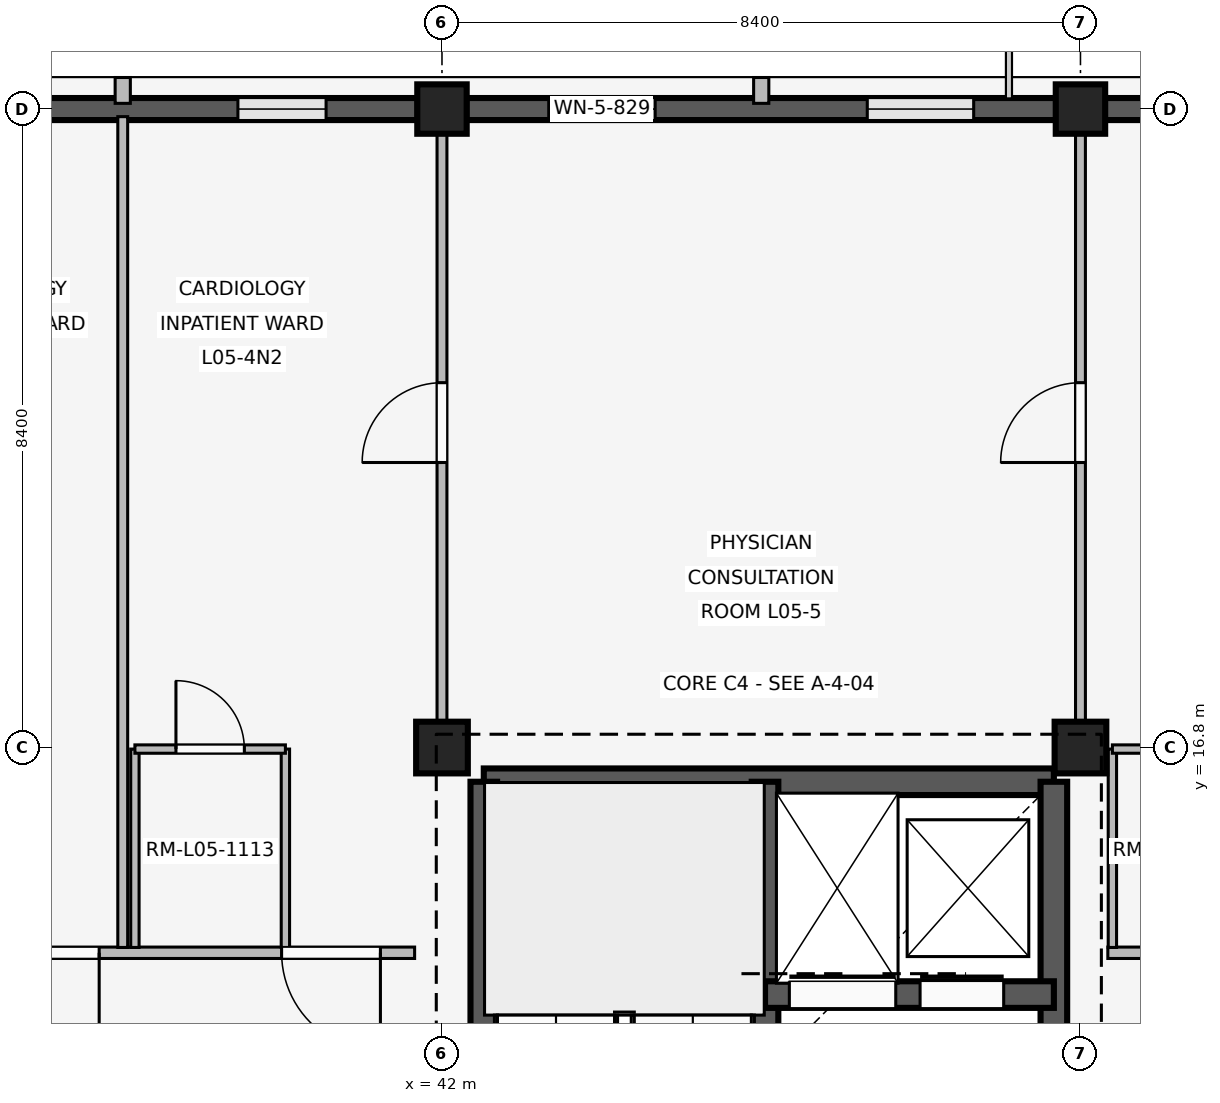
"""IFC4 building model, lengths in metres.
Left out: names, types, materials, properties, quantities, classifications, styles, units other than length and angle.
Written with IfcOpenShell. Run it as: python <this file> out.ifc"""

import sys

from ifc_helpers import new_model, si_unit, direction, frame, frame_2d, origin, origin_2d, place, context, subcontext, project, spatial, rectangle, extrude, element, fill, save


model = new_model("IFC4")
c1 = context("Model", 3, precision=1e-05, world=origin(), true_north=direction((0.0, 1.0)))
c2 = subcontext(c1, "Body", "Model", "MODEL_VIEW")
j1 = project(units=[si_unit("LENGTHUNIT", "METRE"), si_unit("PLANEANGLEUNIT", "RADIAN")], contexts=[c1])
p1 = place(None, origin())
s1 = spatial("IfcSite", under=j1, at=p1, CompositionType="ELEMENT")
p2 = place(p1, origin())
s2 = spatial("IfcBuilding", under=s1, at=p2, CompositionType="ELEMENT")
p3 = place(p2, frame((0.0, 0.0, 20.4)))
s3 = spatial("IfcBuildingStorey", under=s2, at=p3, CompositionType="ELEMENT", Elevation=20.4)
p4 = place(p3, frame((42.0, 16.8, 0.0), z_axis=(0.0, 0.0, 1.0), x_axis=(1.0, 0.0, 0.0)))
e1 = element("IfcColumn", 1, at=p4, inside=s3, PredefinedType="COLUMN", context=c2, shape_type="SweptSolid", body=[
    extrude(rectangle(XDim=0.68, YDim=0.68, at=origin_2d()), origin(), (0.0, 0.0, 1.0), 4.2),
])
p5 = place(p3, frame((42.0, 25.2, 0.0), z_axis=(0.0, 0.0, 1.0), x_axis=(1.0, 0.0, 0.0)))
e2 = element("IfcColumn", 2, at=p5, inside=s3, PredefinedType="COLUMN", context=c2, shape_type="SweptSolid", body=[
    extrude(rectangle(XDim=0.65, YDim=0.65, at=origin_2d()), origin(), (0.0, 0.0, 1.0), 4.2),
])
p6 = place(p3, frame((50.4, 16.8, 0.0), z_axis=(0.0, 0.0, 1.0), x_axis=(1.0, 0.0, 0.0)))
e3 = element("IfcColumn", 3, at=p6, inside=s3, PredefinedType="COLUMN", context=c2, shape_type="SweptSolid", body=[
    extrude(rectangle(XDim=0.68, YDim=0.68, at=origin_2d()), origin(), (0.0, 0.0, 1.0), 4.2),
])
p7 = place(p3, frame((50.4, 25.2, 0.0), z_axis=(0.0, 0.0, 1.0), x_axis=(1.0, 0.0, 0.0)))
e4 = element("IfcColumn", 4, at=p7, inside=s3, PredefinedType="COLUMN", context=c2, shape_type="SweptSolid", body=[
    extrude(rectangle(XDim=0.65, YDim=0.65, at=origin_2d()), origin(), (0.0, 0.0, 1.0), 4.2),
])
p8 = place(p3, frame((33.92, 25.2, 0.0), z_axis=(0.0, 0.0, 1.0), x_axis=(1.0, 0.0, 0.0)))
e5 = element("IfcWall", 5, at=p8, inside=s3, PredefinedType="SOLIDWALL", context=c2, shape_type="SweptSolid", body=[
    extrude(rectangle(XDim=7.76, YDim=0.29, at=frame_2d((3.88, 0.0))), origin(), (0.0, 0.0, 1.0), 3.34),
])
p9 = place(p8, frame((1.205, 0.0, 0.85)))
e6 = element("IfcOpeningElement", 6, at=p9, cuts=e5, PredefinedType="OPENING", context=c2, shape_type="SweptSolid", body=[
    extrude(rectangle(XDim=1.16, YDim=1.48, at=frame_2d((0.58, 0.74))), frame((0.0, 0.155, 0.0), z_axis=(0.0, -1.0, 0.0), x_axis=(1.0, 0.0, 0.0)), (0.0, 0.0, 1.0), 0.31),
])
p10 = place(p8, frame((5.395, 0.0, 0.85)))
e7 = element("IfcOpeningElement", 7, at=p10, cuts=e5, PredefinedType="OPENING", context=c2, shape_type="SweptSolid", body=[
    extrude(rectangle(XDim=1.16, YDim=1.48, at=frame_2d((0.58, 0.74))), frame((0.0, 0.155, 0.0), z_axis=(0.0, -1.0, 0.0), x_axis=(1.0, 0.0, 0.0)), (0.0, 0.0, 1.0), 0.31),
])
p11 = place(p3, frame((37.8, 25.275, 0.0), z_axis=(0.0, 0.0, 1.0), x_axis=(0.0, 1.0, 0.0)))
e8 = element("IfcWall", 8, at=p11, inside=s3, PredefinedType="ELEMENTEDWALL", context=c2, shape_type="SweptSolid", body=[
    extrude(rectangle(XDim=0.34, YDim=0.2, at=frame_2d((0.17, 0.0))), origin(), (0.0, 0.0, 1.0), 3.32),
])
p12 = place(p3, frame((42.32, 25.2, 0.0), z_axis=(0.0, 0.0, 1.0), x_axis=(1.0, 0.0, 0.0)))
e9 = element("IfcWall", 9, at=p12, inside=s3, PredefinedType="SOLIDWALL", context=c2, shape_type="SweptSolid", body=[
    extrude(rectangle(XDim=7.76, YDim=0.29, at=frame_2d((3.88, 0.0))), origin(), (0.0, 0.0, 1.0), 3.34),
])
p13 = place(p12, frame((1.085, 0.0, 0.85)))
e10 = element("IfcOpeningElement", 10, at=p13, cuts=e9, PredefinedType="OPENING", context=c2, shape_type="SweptSolid", body=[
    extrude(rectangle(XDim=1.4, YDim=1.4, at=frame_2d((0.7, 0.7))), frame((0.0, 0.155, 0.0), z_axis=(0.0, -1.0, 0.0), x_axis=(1.0, 0.0, 0.0)), (0.0, 0.0, 1.0), 0.31),
])
p14 = place(p12, frame((5.275, 0.0, 0.85)))
e11 = element("IfcOpeningElement", 11, at=p14, cuts=e9, PredefinedType="OPENING", context=c2, shape_type="SweptSolid", body=[
    extrude(rectangle(XDim=1.4, YDim=1.4, at=frame_2d((0.7, 0.7))), frame((0.0, 0.155, 0.0), z_axis=(0.0, -1.0, 0.0), x_axis=(1.0, 0.0, 0.0)), (0.0, 0.0, 1.0), 0.31),
])
p15 = place(p3, frame((46.2, 25.275, 0.0), z_axis=(0.0, 0.0, 1.0), x_axis=(0.0, 1.0, 0.0)))
e12 = element("IfcWall", 12, at=p15, inside=s3, PredefinedType="ELEMENTEDWALL", context=c2, shape_type="SweptSolid", body=[
    extrude(rectangle(XDim=0.34, YDim=0.2, at=frame_2d((0.17, 0.0))), origin(), (0.0, 0.0, 1.0), 3.32),
])
p16 = place(p3, frame((50.72, 25.2, 0.0), z_axis=(0.0, 0.0, 1.0), x_axis=(1.0, 0.0, 0.0)))
e13 = element("IfcWall", 13, at=p16, inside=s3, PredefinedType="SOLIDWALL", context=c2, shape_type="SweptSolid", body=[
    extrude(rectangle(XDim=7.76, YDim=0.29, at=frame_2d((3.88, 0.0))), origin(), (0.0, 0.0, 1.0), 3.34),
])
p17 = place(p16, frame((1.035, 0.0, 0.85)))
e14 = element("IfcOpeningElement", 14, at=p17, cuts=e13, PredefinedType="OPENING", context=c2, shape_type="SweptSolid", body=[
    extrude(rectangle(XDim=1.5, YDim=1.55, at=frame_2d((0.75, 0.775))), frame((0.0, 0.155, 0.0), z_axis=(0.0, -1.0, 0.0), x_axis=(1.0, 0.0, 0.0)), (0.0, 0.0, 1.0), 0.31),
])
p18 = place(p16, frame((5.225, 0.0, 0.85)))
e15 = element("IfcOpeningElement", 15, at=p18, cuts=e13, PredefinedType="OPENING", context=c2, shape_type="SweptSolid", body=[
    extrude(rectangle(XDim=1.5, YDim=1.55, at=frame_2d((0.75, 0.775))), frame((0.0, 0.155, 0.0), z_axis=(0.0, -1.0, 0.0), x_axis=(1.0, 0.0, 0.0)), (0.0, 0.0, 1.0), 0.31),
])
p19 = place(p3, frame((42.55, 16.35, 0.0), z_axis=(0.0, 0.0, 1.0), x_axis=(1.0, 0.0, 0.0)))
e16 = element("IfcWall", 16, at=p19, inside=s3, PredefinedType="SHEAR", context=c2, shape_type="SweptSolid", body=[
    extrude(rectangle(XDim=7.5, YDim=0.35, at=frame_2d((3.75, 0.0))), origin(), (0.0, 0.0, 1.0), 3.92),
])
p20 = place(p3, frame((42.55, 8.8, 0.0), z_axis=(0.0, 0.0, 1.0), x_axis=(0.0, 1.0, 0.0)))
e17 = element("IfcWall", 17, at=p20, inside=s3, PredefinedType="SHEAR", context=c2, shape_type="SweptSolid", body=[
    extrude(rectangle(XDim=7.55, YDim=0.35, at=frame_2d((3.775, 0.0))), origin(), (0.0, 0.0, 1.0), 3.92),
])
p21 = place(p20, frame((0.28, 0.0, 0.0)))
e18 = element("IfcOpeningElement", 18, at=p21, cuts=e17, PredefinedType="OPENING", context=c2, shape_type="SweptSolid", body=[
    extrude(rectangle(XDim=1.0, YDim=2.15, at=frame_2d((0.5, 1.075))), frame((0.0, 0.185, 0.0), z_axis=(0.0, -1.0, 0.0), x_axis=(1.0, 0.0, 0.0)), (0.0, 0.0, 1.0), 0.37),
])
p22 = place(p3, frame((50.05, 8.8, 0.0), z_axis=(0.0, 0.0, 1.0), x_axis=(0.0, 1.0, 0.0)))
e19 = element("IfcWall", 19, at=p22, inside=s3, PredefinedType="SHEAR", context=c2, shape_type="SweptSolid", body=[
    extrude(rectangle(XDim=7.55, YDim=0.35, at=frame_2d((3.775, 0.0))), origin(), (0.0, 0.0, 1.0), 3.92),
])
p23 = place(p22, frame((2.4, 0.0, 0.0)))
e20 = element("IfcOpeningElement", 20, at=p23, cuts=e19, PredefinedType="OPENING", context=c2, shape_type="SweptSolid", body=[
    extrude(rectangle(XDim=1.2, YDim=2.2, at=frame_2d((0.6, 1.1))), frame((0.0, 0.185, 0.0), z_axis=(0.0, -1.0, 0.0), x_axis=(1.0, 0.0, 0.0)), (0.0, 0.0, 1.0), 0.37),
])
p24 = place(p3, frame((46.25, 8.8, 0.0), z_axis=(0.0, 0.0, 1.0), x_axis=(0.0, 1.0, 0.0)))
e21 = element("IfcWall", 21, at=p24, inside=s3, PredefinedType="SHEAR", context=c2, shape_type="SweptSolid", body=[
    extrude(rectangle(XDim=7.55, YDim=0.35, at=frame_2d((3.775, 0.0))), origin(), (0.0, 0.0, 1.0), 3.92),
])
p25 = place(p24, frame((0.28, 0.0, 0.0)))
e22 = element("IfcOpeningElement", 22, at=p25, cuts=e21, PredefinedType="OPENING", context=c2, shape_type="SweptSolid", body=[
    extrude(rectangle(XDim=1.0, YDim=2.15, at=frame_2d((0.5, 1.075))), frame((0.0, 0.185, 0.0), z_axis=(0.0, -1.0, 0.0), x_axis=(1.0, 0.0, 0.0)), (0.0, 0.0, 1.0), 0.37),
])
p26 = place(p3, frame((46.25, 13.55, 0.0), z_axis=(0.0, 0.0, 1.0), x_axis=(1.0, 0.0, 0.0)))
e23 = element("IfcWall", 23, at=p26, inside=s3, PredefinedType="SHEAR", context=c2, shape_type="SweptSolid", body=[
    extrude(rectangle(XDim=3.8, YDim=0.35, at=frame_2d((1.9, 0.0))), origin(), (0.0, 0.0, 1.0), 3.92),
])
p27 = place(p26, frame((0.32, 0.0, 0.0)))
e24 = element("IfcOpeningElement", 24, at=p27, cuts=e23, PredefinedType="OPENING", context=c2, shape_type="SweptSolid", body=[
    extrude(rectangle(XDim=1.4, YDim=2.25, at=frame_2d((0.7, 1.125))), frame((0.0, 0.185, 0.0), z_axis=(0.0, -1.0, 0.0), x_axis=(1.0, 0.0, 0.0)), (0.0, 0.0, 1.0), 0.37),
])
p28 = place(p26, frame((2.04, 0.0, 0.0)))
e25 = element("IfcOpeningElement", 25, at=p28, cuts=e23, PredefinedType="OPENING", context=c2, shape_type="SweptSolid", body=[
    extrude(rectangle(XDim=1.1, YDim=2.15, at=frame_2d((0.55, 1.075))), frame((0.0, 0.185, 0.0), z_axis=(0.0, -1.0, 0.0), x_axis=(1.0, 0.0, 0.0)), (0.0, 0.0, 1.0), 0.37),
])
p29 = place(p3, frame((41.64, 14.1, 0.0), z_axis=(0.0, 0.0, 1.0), x_axis=(-1.0, 0.0, 0.0)))
e26 = element("IfcWall", 26, at=p29, inside=s3, PredefinedType="PARTITIONING", context=c2, shape_type="SweptSolid", body=[
    extrude(rectangle(XDim=7.96, YDim=0.15, at=frame_2d((3.98, 0.0))), origin(), (0.0, 0.0, 1.0), 3.32),
])
p30 = place(p29, frame((0.45, 0.0, 0.0)))
e27 = element("IfcOpeningElement", 27, at=p30, cuts=e26, PredefinedType="OPENING", context=c2, shape_type="SweptSolid", body=[
    extrude(rectangle(XDim=1.3, YDim=2.25, at=frame_2d((0.65, 1.125))), frame((0.0, 0.085, 0.0), z_axis=(0.0, -1.0, 0.0), x_axis=(1.0, 0.0, 0.0)), (0.0, 0.0, 1.0), 0.17),
])
p31 = place(p29, frame((4.15, 0.0, 0.0)))
e28 = element("IfcOpeningElement", 28, at=p31, cuts=e26, PredefinedType="OPENING", context=c2, shape_type="SweptSolid", body=[
    extrude(rectangle(XDim=1.3, YDim=2.25, at=frame_2d((0.65, 1.125))), frame((0.0, 0.085, 0.0), z_axis=(0.0, -1.0, 0.0), x_axis=(1.0, 0.0, 0.0)), (0.0, 0.0, 1.0), 0.17),
])
p32 = place(p3, frame((37.8, 14.17, 0.0), z_axis=(0.0, 0.0, 1.0), x_axis=(0.0, 1.0, 0.0)))
e29 = element("IfcWall", 29, at=p32, inside=s3, PredefinedType="PARTITIONING", context=c2, shape_type="SweptSolid", body=[
    extrude(rectangle(XDim=10.93, YDim=0.13, at=frame_2d((5.465, 0.0))), origin(), (0.0, 0.0, 1.0), 3.32),
])
for number, where, z_axis, x_axis in (
    (30, (37.96, 14.17, 0.0), (0.0, 0.0, 1.0), (0.0, 1.0, 0.0)),
    (31, (39.94, 14.17, 0.0), (0.0, 0.0, 1.0), (0.0, 1.0, 0.0)),
):
    element("IfcWall", number, at=place(p3, frame(where, z_axis=z_axis, x_axis=x_axis)), inside=s3, PredefinedType="PARTITIONING", context=c2, shape_type="SweptSolid", body=[
        extrude(rectangle(XDim=2.61, YDim=0.11, at=frame_2d((1.305, 0.0))), origin(), (0.0, 0.0, 1.0), 3.32),
    ])
p33 = place(p3, frame((37.96, 16.78, 0.0), z_axis=(0.0, 0.0, 1.0), x_axis=(1.0, 0.0, 0.0)))
e32 = element("IfcWall", 32, at=p33, inside=s3, PredefinedType="PARTITIONING", context=c2, shape_type="SweptSolid", body=[
    extrude(rectangle(XDim=1.98, YDim=0.11, at=frame_2d((0.99, 0.0))), origin(), (0.0, 0.0, 1.0), 3.32),
])
p34 = place(p33, frame((0.54, 0.0, 0.0)))
e33 = element("IfcOpeningElement", 33, at=p34, cuts=e32, PredefinedType="OPENING", context=c2, shape_type="SweptSolid", body=[
    extrude(rectangle(XDim=0.9, YDim=2.1, at=frame_2d((0.45, 1.05))), frame((0.0, 0.065, 0.0), z_axis=(0.0, -1.0, 0.0), x_axis=(1.0, 0.0, 0.0)), (0.0, 0.0, 1.0), 0.13),
])
p35 = place(p3, frame((42.0, 17.15, 0.0), z_axis=(0.0, 0.0, 1.0), x_axis=(0.0, 1.0, 0.0)))
e34 = element("IfcWall", 34, at=p35, inside=s3, PredefinedType="PARTITIONING", context=c2, shape_type="SweptSolid", body=[
    extrude(rectangle(XDim=7.91, YDim=0.13, at=frame_2d((3.955, 0.0))), origin(), (0.0, 0.0, 1.0), 3.32),
])
p36 = place(p35, frame((3.4, 0.0, 0.0)))
e35 = element("IfcOpeningElement", 35, at=p36, cuts=e34, PredefinedType="OPENING", context=c2, shape_type="SweptSolid", body=[
    extrude(rectangle(XDim=1.05, YDim=2.2, at=frame_2d((0.525, 1.1))), frame((0.0, 0.075, 0.0), z_axis=(0.0, -1.0, 0.0), x_axis=(1.0, 0.0, 0.0)), (0.0, 0.0, 1.0), 0.15),
])
p37 = place(p3, frame((50.4, 17.15, 0.0), z_axis=(0.0, 0.0, 1.0), x_axis=(0.0, 1.0, 0.0)))
e36 = element("IfcWall", 36, at=p37, inside=s3, PredefinedType="PARTITIONING", context=c2, shape_type="SweptSolid", body=[
    extrude(rectangle(XDim=7.91, YDim=0.13, at=frame_2d((3.955, 0.0))), origin(), (0.0, 0.0, 1.0), 3.32),
])
p38 = place(p37, frame((3.4, 0.0, 0.0)))
e37 = element("IfcOpeningElement", 37, at=p38, cuts=e36, PredefinedType="OPENING", context=c2, shape_type="SweptSolid", body=[
    extrude(rectangle(XDim=1.05, YDim=2.2, at=frame_2d((0.525, 1.1))), frame((0.0, 0.075, 0.0), z_axis=(0.0, -1.0, 0.0), x_axis=(1.0, 0.0, 0.0)), (0.0, 0.0, 1.0), 0.15),
])
p39 = place(p3, frame((58.72, 14.1, 0.0), z_axis=(0.0, 0.0, 1.0), x_axis=(-1.0, 0.0, 0.0)))
e38 = element("IfcWall", 38, at=p39, inside=s3, PredefinedType="PARTITIONING", context=c2, shape_type="SweptSolid", body=[
    extrude(rectangle(XDim=7.96, YDim=0.15, at=frame_2d((3.98, 0.0))), origin(), (0.0, 0.0, 1.0), 3.32),
])
p40 = place(p39, frame((0.73, 0.0, 0.0)))
e39 = element("IfcOpeningElement", 39, at=p40, cuts=e38, PredefinedType="OPENING", context=c2, shape_type="SweptSolid", body=[
    extrude(rectangle(XDim=1.3, YDim=2.25, at=frame_2d((0.65, 1.125))), frame((0.0, 0.085, 0.0), z_axis=(0.0, -1.0, 0.0), x_axis=(1.0, 0.0, 0.0)), (0.0, 0.0, 1.0), 0.17),
])
p41 = place(p39, frame((4.43, 0.0, 0.0)))
e40 = element("IfcOpeningElement", 40, at=p41, cuts=e38, PredefinedType="OPENING", context=c2, shape_type="SweptSolid", body=[
    extrude(rectangle(XDim=1.3, YDim=2.25, at=frame_2d((0.65, 1.125))), frame((0.0, 0.085, 0.0), z_axis=(0.0, -1.0, 0.0), x_axis=(1.0, 0.0, 0.0)), (0.0, 0.0, 1.0), 0.17),
])
p42 = place(p3, frame((50.82, 14.17, 0.0), z_axis=(0.0, 0.0, 1.0), x_axis=(0.0, 1.0, 0.0)))
e41 = element("IfcWall", 41, at=p42, inside=s3, PredefinedType="PARTITIONING", context=c2, shape_type="SweptSolid", body=[
    extrude(rectangle(XDim=2.61, YDim=0.11, at=frame_2d((1.305, 0.0))), origin(), (0.0, 0.0, 1.0), 3.32),
])
p43 = place(p3, frame((50.82, 16.78, 0.0), z_axis=(0.0, 0.0, 1.0), x_axis=(1.0, 0.0, 0.0)))
e42 = element("IfcWall", 42, at=p43, inside=s3, PredefinedType="PARTITIONING", context=c2, shape_type="SweptSolid", body=[
    extrude(rectangle(XDim=1.98, YDim=0.11, at=frame_2d((0.99, 0.0))), origin(), (0.0, 0.0, 1.0), 3.32),
])
p44 = place(p43, frame((0.54, 0.0, 0.0)))
e43 = element("IfcOpeningElement", 43, at=p44, cuts=e42, PredefinedType="OPENING", context=c2, shape_type="SweptSolid", body=[
    extrude(rectangle(XDim=0.9, YDim=2.1, at=frame_2d((0.45, 1.05))), frame((0.0, 0.065, 0.0), z_axis=(0.0, -1.0, 0.0), x_axis=(1.0, 0.0, 0.0)), (0.0, 0.0, 1.0), 0.13),
])
p45 = place(p10, origin())
e44 = element("IfcWindow", 44, at=p45, inside=s3, PartitioningType="SINGLE_PANEL", PredefinedType="WINDOW", context=c2, shape_type="SweptSolid", body=[
    extrude(rectangle(XDim=1.16, YDim=1.48, at=frame_2d((0.58, 0.74))), frame((0.0, 0.03, 0.0), z_axis=(0.0, -1.0, 0.0), x_axis=(1.0, 0.0, 0.0)), (0.0, 0.0, 1.0), 0.06),
])
fill(e7, e44)
p46 = place(p13, origin())
e45 = element("IfcWindow", 45, at=p46, inside=s3, PartitioningType="SINGLE_PANEL", PredefinedType="WINDOW", context=c2, shape_type="SweptSolid", body=[
    extrude(rectangle(XDim=1.4, YDim=1.4, at=frame_2d((0.7, 0.7))), frame((0.0, 0.03, 0.0), z_axis=(0.0, -1.0, 0.0), x_axis=(1.0, 0.0, 0.0)), (0.0, 0.0, 1.0), 0.06),
])
fill(e10, e45)
p47 = place(p14, origin())
e46 = element("IfcWindow", 46, at=p47, inside=s3, PartitioningType="SINGLE_PANEL", PredefinedType="WINDOW", context=c2, shape_type="SweptSolid", body=[
    extrude(rectangle(XDim=1.4, YDim=1.4, at=frame_2d((0.7, 0.7))), frame((0.0, 0.03, 0.0), z_axis=(0.0, -1.0, 0.0), x_axis=(1.0, 0.0, 0.0)), (0.0, 0.0, 1.0), 0.06),
])
fill(e11, e46)
p48 = place(p27, origin())
e47 = element("IfcDoor", 47, at=p48, inside=s3, OperationType="SLIDING_TO_LEFT", PredefinedType="DOOR", context=c2, shape_type="SweptSolid", body=[
    extrude(rectangle(XDim=1.4, YDim=2.25, at=frame_2d((0.7, 1.125))), frame((0.0, 0.025, 0.0), z_axis=(0.0, -1.0, 0.0), x_axis=(1.0, 0.0, 0.0)), (0.0, 0.0, 1.0), 0.05),
])
fill(e24, e47)
p49 = place(p28, origin())
e48 = element("IfcDoor", 48, at=p49, inside=s3, OperationType="SLIDING_TO_LEFT", PredefinedType="DOOR", context=c2, shape_type="SweptSolid", body=[
    extrude(rectangle(XDim=1.1, YDim=2.15, at=frame_2d((0.55, 1.075))), frame((0.0, 0.025, 0.0), z_axis=(0.0, -1.0, 0.0), x_axis=(1.0, 0.0, 0.0)), (0.0, 0.0, 1.0), 0.05),
])
fill(e25, e48)
p50 = place(p30, origin())
e49 = element("IfcDoor", 49, at=p50, inside=s3, OperationType="SINGLE_SWING_LEFT", PredefinedType="DOOR", context=c2, shape_type="SweptSolid", body=[
    extrude(rectangle(XDim=1.3, YDim=2.25, at=frame_2d((0.65, 1.125))), frame((0.0, 0.025, 0.0), z_axis=(0.0, -1.0, 0.0), x_axis=(1.0, 0.0, 0.0)), (0.0, 0.0, 1.0), 0.05),
])
fill(e27, e49)
p51 = place(p31, origin())
e50 = element("IfcDoor", 50, at=p51, inside=s3, OperationType="SINGLE_SWING_LEFT", PredefinedType="DOOR", context=c2, shape_type="SweptSolid", body=[
    extrude(rectangle(XDim=1.3, YDim=2.25, at=frame_2d((0.65, 1.125))), frame((0.0, 0.025, 0.0), z_axis=(0.0, -1.0, 0.0), x_axis=(1.0, 0.0, 0.0)), (0.0, 0.0, 1.0), 0.05),
])
fill(e28, e50)
p52 = place(p34, origin())
e51 = element("IfcDoor", 51, at=p52, inside=s3, OperationType="SINGLE_SWING_LEFT", PredefinedType="DOOR", context=c2, shape_type="SweptSolid", body=[
    extrude(rectangle(XDim=0.9, YDim=2.1, at=frame_2d((0.45, 1.05))), frame((0.0, 0.025, 0.0), z_axis=(0.0, -1.0, 0.0), x_axis=(1.0, 0.0, 0.0)), (0.0, 0.0, 1.0), 0.05),
])
fill(e33, e51)
p53 = place(p36, origin())
e52 = element("IfcDoor", 52, at=p53, inside=s3, OperationType="SINGLE_SWING_LEFT", PredefinedType="DOOR", context=c2, shape_type="SweptSolid", body=[
    extrude(rectangle(XDim=1.05, YDim=2.2, at=frame_2d((0.525, 1.1))), frame((0.0, 0.025, 0.0), z_axis=(0.0, -1.0, 0.0), x_axis=(1.0, 0.0, 0.0)), (0.0, 0.0, 1.0), 0.05),
])
fill(e35, e52)
p54 = place(p38, origin())
e53 = element("IfcDoor", 53, at=p54, inside=s3, OperationType="SINGLE_SWING_LEFT", PredefinedType="DOOR", context=c2, shape_type="SweptSolid", body=[
    extrude(rectangle(XDim=1.05, YDim=2.2, at=frame_2d((0.525, 1.1))), frame((0.0, 0.025, 0.0), z_axis=(0.0, -1.0, 0.0), x_axis=(1.0, 0.0, 0.0)), (0.0, 0.0, 1.0), 0.05),
])
fill(e37, e53)
save(model, sys.argv[1])
